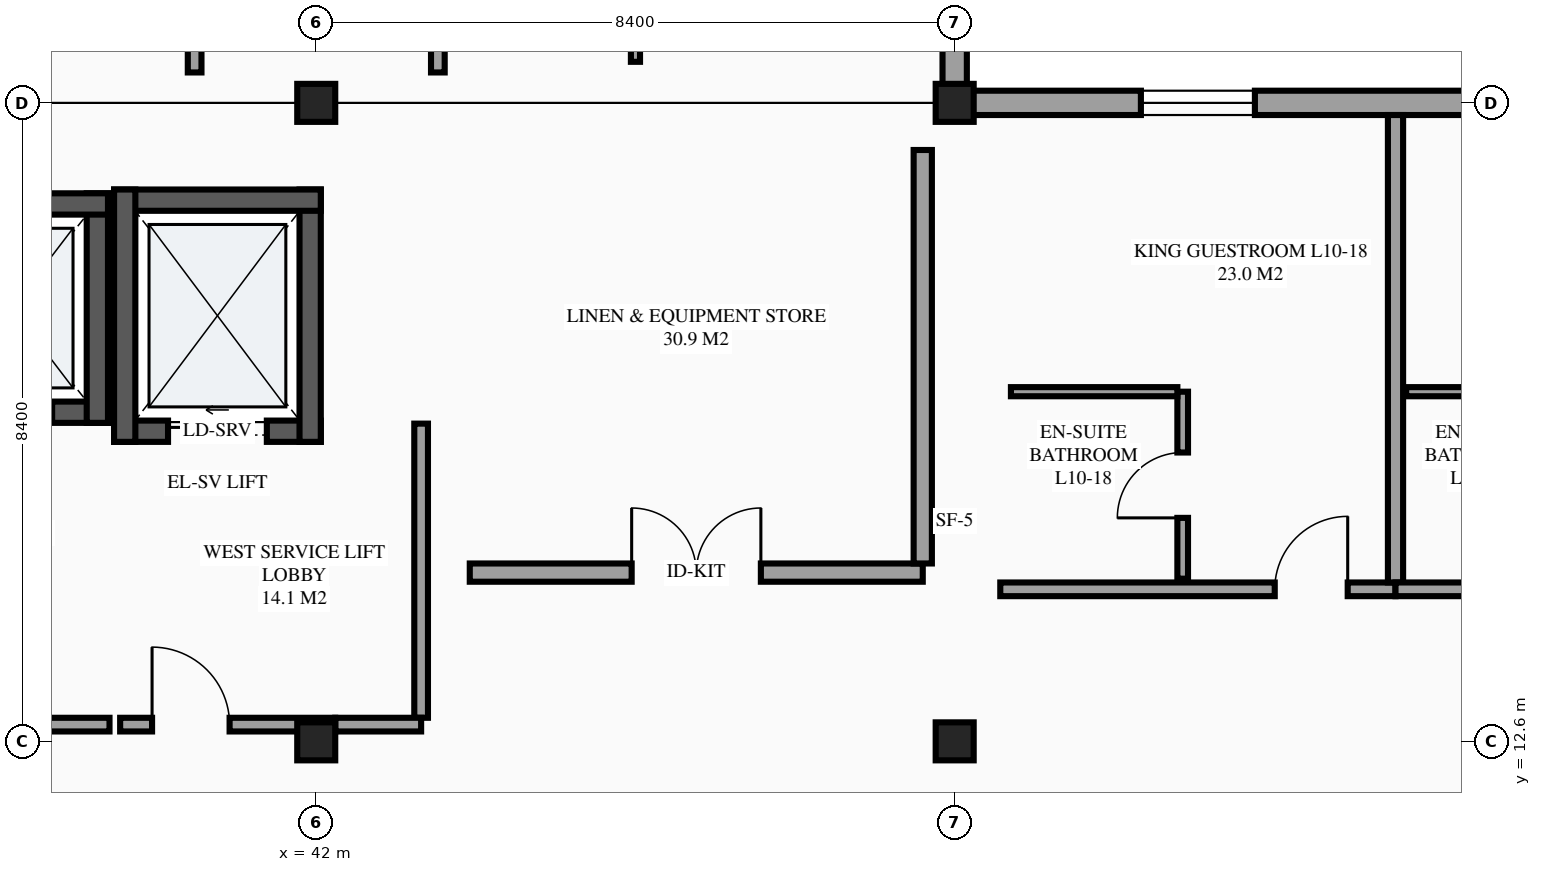
"""IFC4 building model, lengths in metres.
Left out: names, types, materials, properties, quantities, classifications, styles, units other than length and angle.
Written with IfcOpenShell. Run it as: python <this file> out.ifc"""

import sys

from ifc_helpers import new_model, si_unit, direction, frame, frame_2d, origin, origin_2d, place, context, subcontext, project, spatial, rectangle, extrude, element, fill, save


model = new_model("IFC4")
c1 = context("Model", 3, precision=1e-05, world=origin(), true_north=direction((0.0, 1.0)))
c2 = subcontext(c1, "Body", "Model", "MODEL_VIEW")
j1 = project(units=[si_unit("LENGTHUNIT", "METRE"), si_unit("PLANEANGLEUNIT", "RADIAN")], contexts=[c1])
p1 = place(None, origin())
s1 = spatial("IfcSite", under=j1, at=p1, CompositionType="ELEMENT")
p2 = place(p1, origin())
s2 = spatial("IfcBuilding", under=s1, at=p2, CompositionType="ELEMENT")
p3 = place(p2, frame((0.0, 0.0, 39.9)))
s3 = spatial("IfcBuildingStorey", under=s2, at=p3, CompositionType="ELEMENT", Elevation=39.9)
for number, where, z_axis, x_axis in (
    (1, (42.0, 12.6, 0.0), (0.0, 0.0, 1.0), (1.0, 0.0, 0.0)),
    (2, (42.0, 21.0, 0.0), (0.0, 0.0, 1.0), (1.0, 0.0, 0.0)),
    (3, (50.4, 12.6, 0.0), (0.0, 0.0, 1.0), (1.0, 0.0, 0.0)),
    (4, (50.4, 21.0, 0.0), (0.0, 0.0, 1.0), (1.0, 0.0, 0.0)),
):
    element("IfcColumn", number, at=place(p3, frame(where, z_axis=z_axis, x_axis=x_axis)), inside=s3, PredefinedType="COLUMN", context=c2, shape_type="SweptSolid", body=[
        extrude(rectangle(XDim=0.5, YDim=0.5, at=origin_2d()), origin(), (0.0, 0.0, 1.0), 3.6),
    ])
p4 = place(p3, frame((67.2, 21.0, 0.0), z_axis=(0.0, 0.0, 1.0), x_axis=(-1.0, 0.0, 0.0)))
e5 = element("IfcWall", 5, at=p4, inside=s3, PredefinedType="STANDARD", context=c2, shape_type="SweptSolid", body=[
    extrude(rectangle(XDim=16.8, YDim=0.32, at=frame_2d((8.4, 0.0))), origin(), (0.0, 0.0, 1.0), 2.53),
])
p5 = place(p4, frame((12.85, 0.0, 0.85)))
e6 = element("IfcOpeningElement", 6, at=p5, cuts=e5, PredefinedType="OPENING", context=c2, shape_type="SweptSolid", body=[
    extrude(rectangle(XDim=1.5, YDim=1.5, at=frame_2d((0.75, 0.75))), frame((0.0, 0.17, 0.0), z_axis=(0.0, -1.0, 0.0), x_axis=(1.0, 0.0, 0.0)), (0.0, 0.0, 1.0), 0.34),
])
p6 = place(p4, frame((6.15, 0.0, 0.85)))
e7 = element("IfcOpeningElement", 7, at=p6, cuts=e5, PredefinedType="OPENING", context=c2, shape_type="SweptSolid", body=[
    extrude(rectangle(XDim=1.5, YDim=1.5, at=frame_2d((0.75, 0.75))), frame((0.0, 0.17, 0.0), z_axis=(0.0, -1.0, 0.0), x_axis=(1.0, 0.0, 0.0)), (0.0, 0.0, 1.0), 0.34),
])
p7 = place(p4, frame((2.45, 0.0, 0.85)))
e8 = element("IfcOpeningElement", 8, at=p7, cuts=e5, PredefinedType="OPENING", context=c2, shape_type="SweptSolid", body=[
    extrude(rectangle(XDim=1.5, YDim=1.5, at=frame_2d((0.75, 0.75))), frame((0.0, 0.17, 0.0), z_axis=(0.0, -1.0, 0.0), x_axis=(1.0, 0.0, 0.0)), (0.0, 0.0, 1.0), 0.34),
])
p8 = place(p3, frame((50.4, 21.0, 0.0), z_axis=(0.0, 0.0, 1.0), x_axis=(0.0, 1.0, 0.0)))
e9 = element("IfcWall", 9, at=p8, inside=s3, PredefinedType="STANDARD", context=c2, shape_type="SweptSolid", body=[
    extrude(rectangle(XDim=16.8, YDim=0.32, at=frame_2d((8.4, 0.0))), origin(), (0.0, 0.0, 1.0), 2.48),
])
p9 = place(p8, frame((2.4, 0.0, 0.85)))
e10 = element("IfcOpeningElement", 10, at=p9, cuts=e9, PredefinedType="OPENING", context=c2, shape_type="SweptSolid", body=[
    extrude(rectangle(XDim=1.5, YDim=1.5, at=frame_2d((0.75, 0.75))), frame((0.0, 0.17, 0.0), z_axis=(0.0, -1.0, 0.0), x_axis=(1.0, 0.0, 0.0)), (0.0, 0.0, 1.0), 0.34),
])
p10 = place(p8, frame((9.15, 0.0, 0.85)))
e11 = element("IfcOpeningElement", 11, at=p10, cuts=e9, PredefinedType="OPENING", context=c2, shape_type="SweptSolid", body=[
    extrude(rectangle(XDim=1.5, YDim=1.5, at=frame_2d((0.75, 0.75))), frame((0.0, 0.17, 0.0), z_axis=(0.0, -1.0, 0.0), x_axis=(1.0, 0.0, 0.0)), (0.0, 0.0, 1.0), 0.34),
])
p11 = place(p3, frame((36.74, 16.93, 0.0), z_axis=(0.0, 0.0, 1.0), x_axis=(1.0, 0.0, 0.0)))
e12 = element("IfcWall", 12, at=p11, inside=s3, PredefinedType="SHEAR", context=c2, shape_type="SweptSolid", body=[
    extrude(rectangle(XDim=2.52, YDim=0.28, at=frame_2d((1.26, 0.0))), origin(), (0.0, 0.0, 1.0), 3.6),
])
p12 = place(p11, frame((0.735, 0.0, 0.0)))
e13 = element("IfcOpeningElement", 13, at=p12, cuts=e12, PredefinedType="OPENING", context=c2, shape_type="SweptSolid", body=[
    extrude(rectangle(XDim=1.05, YDim=2.2, at=frame_2d((0.525, 1.1))), frame((0.0, 0.15, 0.0), z_axis=(0.0, -1.0, 0.0), x_axis=(1.0, 0.0, 0.0)), (0.0, 0.0, 1.0), 0.3),
])
p13 = place(p3, frame((39.12, 16.79, 0.0), z_axis=(0.0, 0.0, 1.0), x_axis=(0.0, 1.0, 0.0)))
e14 = element("IfcWall", 14, at=p13, inside=s3, PredefinedType="SHEAR", context=c2, shape_type="SweptSolid", body=[
    extrude(rectangle(XDim=3.02, YDim=0.28, at=frame_2d((1.51, 0.0))), origin(), (0.0, 0.0, 1.0), 3.6),
])
p14 = place(p3, frame((39.26, 19.67, 0.0), z_axis=(0.0, 0.0, 1.0), x_axis=(-1.0, 0.0, 0.0)))
e15 = element("IfcWall", 15, at=p14, inside=s3, PredefinedType="SHEAR", context=c2, shape_type="SweptSolid", body=[
    extrude(rectangle(XDim=2.52, YDim=0.28, at=frame_2d((1.26, 0.0))), origin(), (0.0, 0.0, 1.0), 3.6),
])
p15 = place(p3, frame((39.34, 16.68, 0.0), z_axis=(0.0, 0.0, 1.0), x_axis=(1.0, 0.0, 0.0)))
e16 = element("IfcWall", 16, at=p15, inside=s3, PredefinedType="SHEAR", context=c2, shape_type="SweptSolid", body=[
    extrude(rectangle(XDim=2.72, YDim=0.28, at=frame_2d((1.36, 0.0))), origin(), (0.0, 0.0, 1.0), 3.6),
])
p16 = place(p15, frame((0.71, 0.0, 0.0)))
e17 = element("IfcOpeningElement", 17, at=p16, cuts=e16, PredefinedType="OPENING", context=c2, shape_type="SweptSolid", body=[
    extrude(rectangle(XDim=1.3, YDim=2.25, at=frame_2d((0.65, 1.125))), frame((0.0, 0.15, 0.0), z_axis=(0.0, -1.0, 0.0), x_axis=(1.0, 0.0, 0.0)), (0.0, 0.0, 1.0), 0.3),
])
p17 = place(p3, frame((41.92, 16.54, 0.0), z_axis=(0.0, 0.0, 1.0), x_axis=(0.0, 1.0, 0.0)))
e18 = element("IfcWall", 18, at=p17, inside=s3, PredefinedType="SHEAR", context=c2, shape_type="SweptSolid", body=[
    extrude(rectangle(XDim=3.32, YDim=0.28, at=frame_2d((1.66, 0.0))), origin(), (0.0, 0.0, 1.0), 3.6),
])
p18 = place(p3, frame((42.06, 19.72, 0.0), z_axis=(0.0, 0.0, 1.0), x_axis=(-1.0, 0.0, 0.0)))
e19 = element("IfcWall", 19, at=p18, inside=s3, PredefinedType="SHEAR", context=c2, shape_type="SweptSolid", body=[
    extrude(rectangle(XDim=2.72, YDim=0.28, at=frame_2d((1.36, 0.0))), origin(), (0.0, 0.0, 1.0), 3.6),
])
p19 = place(p3, frame((39.48, 19.86, 0.0), z_axis=(0.0, 0.0, 1.0), x_axis=(0.0, -1.0, 0.0)))
e20 = element("IfcWall", 20, at=p19, inside=s3, PredefinedType="SHEAR", context=c2, shape_type="SweptSolid", body=[
    extrude(rectangle(XDim=3.32, YDim=0.28, at=frame_2d((1.66, 0.0))), origin(), (0.0, 0.0, 1.0), 3.6),
])
p20 = place(p3, frame((51.0, 14.6, 0.0), z_axis=(0.0, 0.0, 1.0), x_axis=(1.0, 0.0, 0.0)))
e21 = element("IfcWall", 21, at=p20, inside=s3, PredefinedType="PARTITIONING", context=c2, shape_type="SweptSolid", body=[
    extrude(rectangle(XDim=5.2, YDim=0.18, at=frame_2d((2.6, 0.0))), origin(), (0.0, 0.0, 1.0), 3.375),
])
p21 = place(p20, frame((3.611, 0.0, 0.0)))
e22 = element("IfcOpeningElement", 22, at=p21, cuts=e21, PredefinedType="OPENING", context=c2, shape_type="SweptSolid", body=[
    extrude(rectangle(XDim=0.96, YDim=2.15, at=frame_2d((0.48, 1.075))), frame((0.0, 0.1, 0.0), z_axis=(0.0, -1.0, 0.0), x_axis=(1.0, 0.0, 0.0)), (0.0, 0.0, 1.0), 0.2),
])
p22 = place(p3, frame((56.2, 14.69, 0.0), z_axis=(0.0, 0.0, 1.0), x_axis=(0.0, 1.0, 0.0)))
e23 = element("IfcWall", 23, at=p22, inside=s3, PredefinedType="PARTITIONING", context=c2, shape_type="SweptSolid", body=[
    extrude(rectangle(XDim=6.15, YDim=0.2, at=frame_2d((3.075, 0.0))), origin(), (0.0, 0.0, 1.0), 3.375),
])
p23 = place(p3, frame((53.4, 14.74, 0.0), z_axis=(0.0, 0.0, 1.0), x_axis=(0.0, 1.0, 0.0)))
e24 = element("IfcWall", 24, at=p23, inside=s3, PredefinedType="PARTITIONING", context=c2, shape_type="SweptSolid", body=[
    extrude(rectangle(XDim=2.46, YDim=0.14, at=frame_2d((1.23, 0.0))), origin(), (0.0, 0.0, 1.0), 3.375),
])
p24 = place(p23, frame((0.8, 0.0, 0.0)))
e25 = element("IfcOpeningElement", 25, at=p24, cuts=e24, PredefinedType="OPENING", context=c2, shape_type="SweptSolid", body=[
    extrude(rectangle(XDim=0.86, YDim=2.1, at=frame_2d((0.43, 1.05))), frame((0.0, 0.08, 0.0), z_axis=(0.0, -1.0, 0.0), x_axis=(1.0, 0.0, 0.0)), (0.0, 0.0, 1.0), 0.16),
])
p25 = place(p3, frame((51.14, 17.2, 0.0), z_axis=(0.0, 0.0, 1.0), x_axis=(1.0, 0.0, 0.0)))
e26 = element("IfcWall", 26, at=p25, inside=s3, PredefinedType="PARTITIONING", context=c2, shape_type="SweptSolid", body=[
    extrude(rectangle(XDim=2.19, YDim=0.12, at=frame_2d((1.095, 0.0))), origin(), (0.0, 0.0, 1.0), 3.375),
])
p26 = place(p3, frame((56.2, 14.6, 0.0), z_axis=(0.0, 0.0, 1.0), x_axis=(1.0, 0.0, 0.0)))
e27 = element("IfcWall", 27, at=p26, inside=s3, PredefinedType="PARTITIONING", context=c2, shape_type="SweptSolid", body=[
    extrude(rectangle(XDim=5.2, YDim=0.18, at=frame_2d((2.6, 0.0))), origin(), (0.0, 0.0, 1.0), 3.375),
])
p27 = place(p26, frame((3.611, 0.0, 0.0)))
e28 = element("IfcOpeningElement", 28, at=p27, cuts=e27, PredefinedType="OPENING", context=c2, shape_type="SweptSolid", body=[
    extrude(rectangle(XDim=0.96, YDim=2.15, at=frame_2d((0.48, 1.075))), frame((0.0, 0.1, 0.0), z_axis=(0.0, -1.0, 0.0), x_axis=(1.0, 0.0, 0.0)), (0.0, 0.0, 1.0), 0.2),
])
p28 = place(p3, frame((56.34, 17.2, 0.0), z_axis=(0.0, 0.0, 1.0), x_axis=(1.0, 0.0, 0.0)))
e29 = element("IfcWall", 29, at=p28, inside=s3, PredefinedType="PARTITIONING", context=c2, shape_type="SweptSolid", body=[
    extrude(rectangle(XDim=2.19, YDim=0.12, at=frame_2d((1.095, 0.0))), origin(), (0.0, 0.0, 1.0), 3.375),
])
p29 = place(p3, frame((40.4, 21.4, 0.0), z_axis=(0.0, 0.0, 1.0), x_axis=(0.0, 1.0, 0.0)))
e30 = element("IfcWall", 30, at=p29, inside=s3, PredefinedType="PARTITIONING", context=c2, shape_type="SweptSolid", body=[
    extrude(rectangle(XDim=5.686, YDim=0.18, at=frame_2d((2.843, 0.0))), origin(), (0.0, 0.0, 1.0), 3.375),
])
p30 = place(p29, frame((3.548, 0.0, 0.0)))
e31 = element("IfcOpeningElement", 31, at=p30, cuts=e30, PredefinedType="OPENING", context=c2, shape_type="SweptSolid", body=[
    extrude(rectangle(XDim=0.96, YDim=2.15, at=frame_2d((0.48, 1.075))), frame((0.0, 0.1, 0.0), z_axis=(0.0, -1.0, 0.0), x_axis=(1.0, 0.0, 0.0)), (0.0, 0.0, 1.0), 0.2),
])
p31 = place(p3, frame((43.6, 21.4, 0.0), z_axis=(0.0, 0.0, 1.0), x_axis=(0.0, 1.0, 0.0)))
e32 = element("IfcWall", 32, at=p31, inside=s3, PredefinedType="PARTITIONING", context=c2, shape_type="SweptSolid", body=[
    extrude(rectangle(XDim=5.5, YDim=0.18, at=frame_2d((2.75, 0.0))), origin(), (0.0, 0.0, 1.0), 3.375),
])
p32 = place(p31, frame((3.455, 0.0, 0.0)))
e33 = element("IfcOpeningElement", 33, at=p32, cuts=e32, PredefinedType="OPENING", context=c2, shape_type="SweptSolid", body=[
    extrude(rectangle(XDim=0.96, YDim=2.15, at=frame_2d((0.48, 1.075))), frame((0.0, 0.1, 0.0), z_axis=(0.0, -1.0, 0.0), x_axis=(1.0, 0.0, 0.0)), (0.0, 0.0, 1.0), 0.2),
])
p33 = place(p3, frame((46.2, 21.54, 0.0), z_axis=(0.0, 0.0, 1.0), x_axis=(0.0, 1.0, 0.0)))
e34 = element("IfcWall", 34, at=p33, inside=s3, PredefinedType="PARTITIONING", context=c2, shape_type="SweptSolid", body=[
    extrude(rectangle(XDim=2.19, YDim=0.12, at=frame_2d((1.095, 0.0))), origin(), (0.0, 0.0, 1.0), 3.375),
])
p34 = place(p3, frame((33.82, 12.82, 0.0), z_axis=(0.0, 0.0, 1.0), x_axis=(1.0, 0.0, 0.0)))
e35 = element("IfcWall", 35, at=p34, inside=s3, PredefinedType="PARTITIONING", context=c2, shape_type="SweptSolid", body=[
    extrude(rectangle(XDim=5.46, YDim=0.18, at=frame_2d((2.73, 0.0))), origin(), (0.0, 0.0, 1.0), 3.375),
])
p35 = place(p34, frame((1.98, 0.0, 0.0)))
e36 = element("IfcOpeningElement", 36, at=p35, cuts=e35, PredefinedType="OPENING", context=c2, shape_type="SweptSolid", body=[
    extrude(rectangle(XDim=1.5, YDim=2.15, at=frame_2d((0.75, 1.075))), frame((0.0, 0.1, 0.0), z_axis=(0.0, -1.0, 0.0), x_axis=(1.0, 0.0, 0.0)), (0.0, 0.0, 1.0), 0.2),
])
p36 = place(p3, frame((39.42, 12.82, 0.0), z_axis=(0.0, 0.0, 1.0), x_axis=(1.0, 0.0, 0.0)))
e37 = element("IfcWall", 37, at=p36, inside=s3, PredefinedType="PARTITIONING", context=c2, shape_type="SweptSolid", body=[
    extrude(rectangle(XDim=2.83, YDim=0.18, at=frame_2d((1.415, 0.0))), origin(), (0.0, 0.0, 1.0), 3.375),
])
p37 = place(p36, frame((0.42, 0.0, 0.0)))
e38 = element("IfcOpeningElement", 38, at=p37, cuts=e37, PredefinedType="OPENING", context=c2, shape_type="SweptSolid", body=[
    extrude(rectangle(XDim=1.02, YDim=2.15, at=frame_2d((0.51, 1.075))), frame((0.0, 0.1, 0.0), z_axis=(0.0, -1.0, 0.0), x_axis=(1.0, 0.0, 0.0)), (0.0, 0.0, 1.0), 0.2),
])
p38 = place(p3, frame((43.38, 12.91, 0.0), z_axis=(0.0, 0.0, 1.0), x_axis=(0.0, 1.0, 0.0)))
e39 = element("IfcWall", 39, at=p38, inside=s3, PredefinedType="PARTITIONING", context=c2, shape_type="SweptSolid", body=[
    extrude(rectangle(XDim=3.87, YDim=0.18, at=frame_2d((1.935, 0.0))), origin(), (0.0, 0.0, 1.0), 3.375),
])
p39 = place(p3, frame((44.02, 14.82, 0.0), z_axis=(0.0, 0.0, 1.0), x_axis=(1.0, 0.0, 0.0)))
e40 = element("IfcWall", 40, at=p39, inside=s3, PredefinedType="PARTITIONING", context=c2, shape_type="SweptSolid", body=[
    extrude(rectangle(XDim=5.96, YDim=0.24, at=frame_2d((2.98, 0.0))), origin(), (0.0, 0.0, 1.0), 3.375),
])
p40 = place(p39, frame((2.13, 0.0, 0.0)))
e41 = element("IfcOpeningElement", 41, at=p40, cuts=e40, PredefinedType="OPENING", context=c2, shape_type="SweptSolid", body=[
    extrude(rectangle(XDim=1.7, YDim=2.2, at=frame_2d((0.85, 1.1))), frame((0.0, 0.13, 0.0), z_axis=(0.0, -1.0, 0.0), x_axis=(1.0, 0.0, 0.0)), (0.0, 0.0, 1.0), 0.26),
])
p41 = place(p3, frame((49.98, 14.94, 0.0), z_axis=(0.0, 0.0, 1.0), x_axis=(0.0, 1.0, 0.0)))
e42 = element("IfcWall", 42, at=p41, inside=s3, PredefinedType="PARTITIONING", context=c2, shape_type="SweptSolid", body=[
    extrude(rectangle(XDim=5.44, YDim=0.24, at=frame_2d((2.72, 0.0))), origin(), (0.0, 0.0, 1.0), 3.375),
])
p42 = place(p3, frame((42.25, 12.82, 0.0), z_axis=(0.0, 0.0, 1.0), x_axis=(1.0, 0.0, 0.0)))
e43 = element("IfcWall", 43, at=p42, inside=s3, PredefinedType="PARTITIONING", context=c2, shape_type="SweptSolid", body=[
    extrude(rectangle(XDim=1.13, YDim=0.18, at=frame_2d((0.565, 0.0))), origin(), (0.0, 0.0, 1.0), 2.43),
])
p43 = place(p5, origin())
e44 = element("IfcWindow", 44, at=p43, inside=s3, PartitioningType="SINGLE_PANEL", PredefinedType="WINDOW", context=c2, shape_type="SweptSolid", body=[
    extrude(rectangle(XDim=1.5, YDim=1.5, at=frame_2d((0.75, 0.75))), frame((0.0, 0.03, 0.0), z_axis=(0.0, -1.0, 0.0), x_axis=(1.0, 0.0, 0.0)), (0.0, 0.0, 1.0), 0.06),
])
fill(e6, e44)
p44 = place(p12, origin())
e45 = element("IfcDoor", 45, at=p44, inside=s3, OperationType="SLIDING_TO_LEFT", PredefinedType="DOOR", context=c2, shape_type="SweptSolid", body=[
    extrude(rectangle(XDim=1.05, YDim=2.2, at=frame_2d((0.525, 1.1))), frame((0.0, 0.025, 0.0), z_axis=(0.0, -1.0, 0.0), x_axis=(1.0, 0.0, 0.0)), (0.0, 0.0, 1.0), 0.05),
])
fill(e13, e45)
p45 = place(p16, origin())
e46 = element("IfcDoor", 46, at=p45, inside=s3, OperationType="SLIDING_TO_LEFT", PredefinedType="DOOR", context=c2, shape_type="SweptSolid", body=[
    extrude(rectangle(XDim=1.3, YDim=2.25, at=frame_2d((0.65, 1.125))), frame((0.0, 0.025, 0.0), z_axis=(0.0, -1.0, 0.0), x_axis=(1.0, 0.0, 0.0)), (0.0, 0.0, 1.0), 0.05),
])
fill(e17, e46)
p46 = place(p21, origin())
e47 = element("IfcDoor", 47, at=p46, inside=s3, OperationType="SINGLE_SWING_RIGHT", PredefinedType="DOOR", context=c2, shape_type="SweptSolid", body=[
    extrude(rectangle(XDim=0.96, YDim=2.15, at=frame_2d((0.48, 1.075))), frame((0.0, 0.025, 0.0), z_axis=(0.0, -1.0, 0.0), x_axis=(1.0, 0.0, 0.0)), (0.0, 0.0, 1.0), 0.05),
])
fill(e22, e47)
p47 = place(p24, origin())
e48 = element("IfcDoor", 48, at=p47, inside=s3, OperationType="SINGLE_SWING_LEFT", PredefinedType="DOOR", context=c2, shape_type="SweptSolid", body=[
    extrude(rectangle(XDim=0.86, YDim=2.1, at=frame_2d((0.43, 1.05))), frame((0.0, 0.025, 0.0), z_axis=(0.0, -1.0, 0.0), x_axis=(1.0, 0.0, 0.0)), (0.0, 0.0, 1.0), 0.05),
])
fill(e25, e48)
p48 = place(p37, origin())
e49 = element("IfcDoor", 49, at=p48, inside=s3, OperationType="SINGLE_SWING_LEFT", PredefinedType="DOOR", context=c2, shape_type="SweptSolid", body=[
    extrude(rectangle(XDim=1.02, YDim=2.15, at=frame_2d((0.51, 1.075))), frame((0.0, 0.025, 0.0), z_axis=(0.0, -1.0, 0.0), x_axis=(1.0, 0.0, 0.0)), (0.0, 0.0, 1.0), 0.05),
])
fill(e38, e49)
p49 = place(p40, origin())
e50 = element("IfcDoor", 50, at=p49, inside=s3, OperationType="DOUBLE_DOOR_SINGLE_SWING", PredefinedType="DOOR", context=c2, shape_type="SweptSolid", body=[
    extrude(rectangle(XDim=1.7, YDim=2.2, at=frame_2d((0.85, 1.1))), frame((0.0, 0.025, 0.0), z_axis=(0.0, -1.0, 0.0), x_axis=(1.0, 0.0, 0.0)), (0.0, 0.0, 1.0), 0.05),
])
fill(e41, e50)
save(model, sys.argv[1])
